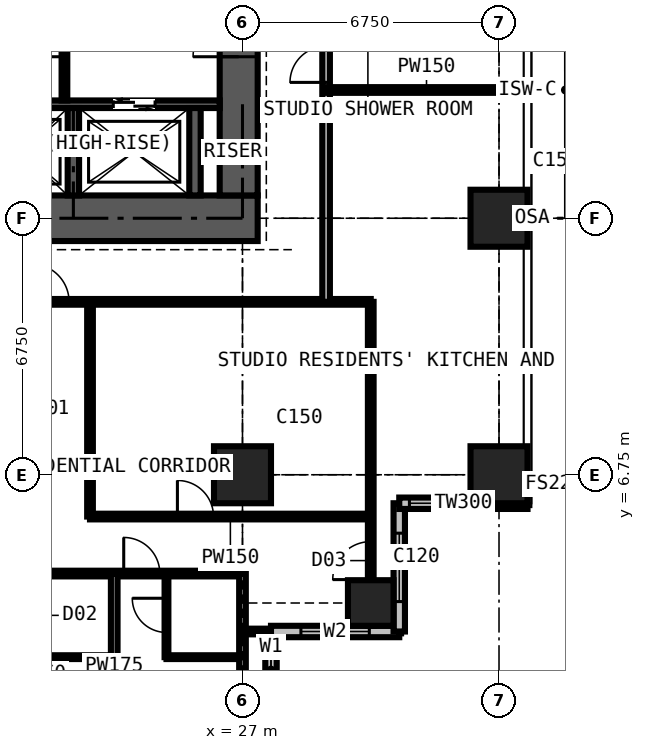
"""IFC4 building model, lengths in metres.
Left out: names, types, materials, properties, quantities, classifications, styles, units other than length and angle.
Written with IfcOpenShell. Run it as: python <this file> out.ifc"""

import sys

from ifc_helpers import new_model, si_unit, direction, frame, frame_2d, origin, origin_2d, place, context, subcontext, project, spatial, rectangle, extrude, element, fill, save


model = new_model("IFC4")
c1 = context("Model", 3, precision=1e-05, world=origin(), true_north=direction((0.0, 1.0)))
c2 = subcontext(c1, "Body", "Model", "MODEL_VIEW")
j1 = project(units=[si_unit("LENGTHUNIT", "METRE"), si_unit("PLANEANGLEUNIT", "RADIAN")], contexts=[c1])
p1 = place(None, origin())
s1 = spatial("IfcSite", under=j1, at=p1, CompositionType="ELEMENT")
p2 = place(p1, origin())
s2 = spatial("IfcBuilding", under=s1, at=p2, CompositionType="ELEMENT")
p3 = place(p2, frame((0.0, 0.0, 160.2)))
s3 = spatial("IfcBuildingStorey", under=s2, at=p3, CompositionType="ELEMENT", Elevation=160.2)
p4 = place(p3, frame((27.0, 6.75, 0.0), z_axis=(0.0, 0.0, 1.0), x_axis=(1.0, 0.0, 0.0)))
e1 = element("IfcColumn", 1, at=p4, inside=s3, PredefinedType="COLUMN", context=c2, shape_type="SweptSolid", body=[
    extrude(rectangle(XDim=1.5, YDim=1.5, at=origin_2d()), origin(), (0.0, 0.0, 1.0), 3.6),
])
p5 = place(p3, frame((30.375, 3.375, 0.0), z_axis=(0.0, 0.0, 1.0), x_axis=(1.0, 0.0, 0.0)))
e2 = element("IfcColumn", 2, at=p5, inside=s3, PredefinedType="COLUMN", context=c2, shape_type="SweptSolid", body=[
    extrude(rectangle(XDim=1.2, YDim=1.2, at=origin_2d()), origin(), (0.0, 0.0, 1.0), 3.6),
])
for number, where, z_axis, x_axis in (
    (3, (33.75, 6.75, 0.0), (0.0, 0.0, 1.0), (1.0, 0.0, 0.0)),
    (4, (33.75, 13.5, 0.0), (0.0, 0.0, 1.0), (1.0, 0.0, 0.0)),
):
    element("IfcColumn", number, at=place(p3, frame(where, z_axis=z_axis, x_axis=x_axis)), inside=s3, PredefinedType="COLUMN", context=c2, shape_type="SweptSolid", body=[
        extrude(rectangle(XDim=1.5, YDim=1.5, at=origin_2d()), origin(), (0.0, 0.0, 1.0), 3.6),
    ])
p6 = place(p3, frame((13.1, 13.5, 0.0), z_axis=(0.0, 0.0, 1.0), x_axis=(1.0, 0.0, 0.0)))
e5 = element("IfcWall", 5, at=p6, inside=s3, PredefinedType="SHEAR", context=c2, shape_type="SweptSolid", body=[
    extrude(rectangle(XDim=14.3, YDim=1.2, at=frame_2d((7.15, 0.0))), origin(), (0.0, 0.0, 1.0), 3.6),
])
p7 = place(p3, frame((26.9, 14.1, 0.0), z_axis=(0.0, 0.0, 1.0), x_axis=(0.0, 1.0, 0.0)))
e6 = element("IfcWall", 6, at=p7, inside=s3, PredefinedType="SHEAR", context=c2, shape_type="SweptSolid", body=[
    extrude(rectangle(XDim=12.3, YDim=1.0, at=frame_2d((6.15, 0.0))), origin(), (0.0, 0.0, 1.0), 3.6),
])
p8 = place(p7, frame((3.65, 0.0, 0.0)))
e7 = element("IfcOpeningElement", 7, at=p8, cuts=e6, PredefinedType="OPENING", context=c2, shape_type="SweptSolid", body=[
    extrude(rectangle(XDim=1.2, YDim=2.2, at=frame_2d((0.6, 1.1))), frame((0.0, 0.51, 0.0), z_axis=(0.0, -1.0, 0.0), x_axis=(1.0, 0.0, 0.0)), (0.0, 0.0, 1.0), 1.02),
])
p9 = place(p3, frame((27.75, -0.75, 0.0), z_axis=(0.0, 0.0, 1.0), x_axis=(0.0, 1.0, 0.0)))
e8 = element("IfcWall", 8, at=p9, inside=s3, PredefinedType="SOLIDWALL", context=c2, shape_type="SweptSolid", body=[
    extrude(rectangle(XDim=3.375, YDim=0.3, at=frame_2d((1.688, 0.0))), origin(), (0.0, 0.0, 1.0), 3.375),
])
p10 = place(p9, frame((1.607, 0.0, 0.9)))
e9 = element("IfcOpeningElement", 9, at=p10, cuts=e8, PredefinedType="OPENING", context=c2, shape_type="SweptSolid", body=[
    extrude(rectangle(XDim=1.5, YDim=1.8, at=frame_2d((0.75, 0.9))), frame((0.0, 0.16, 0.0), z_axis=(0.0, -1.0, 0.0), x_axis=(1.0, 0.0, 0.0)), (0.0, 0.0, 1.0), 0.32),
])
p11 = place(p3, frame((27.75, 2.625, 0.0), z_axis=(0.0, 0.0, 1.0), x_axis=(1.0, 0.0, 0.0)))
e10 = element("IfcWall", 10, at=p11, inside=s3, PredefinedType="SOLIDWALL", context=c2, shape_type="SweptSolid", body=[
    extrude(rectangle(XDim=3.375, YDim=0.3, at=frame_2d((1.688, 0.0))), origin(), (0.0, 0.0, 1.0), 3.375),
])
p12 = place(p11, frame((0.788, 0.0, 0.6)))
e11 = element("IfcOpeningElement", 11, at=p12, cuts=e10, PredefinedType="OPENING", context=c2, shape_type="SweptSolid", body=[
    extrude(rectangle(XDim=1.8, YDim=2.1, at=frame_2d((0.9, 1.05))), frame((0.0, 0.16, 0.0), z_axis=(0.0, -1.0, 0.0), x_axis=(1.0, 0.0, 0.0)), (0.0, 0.0, 1.0), 0.32),
])
p13 = place(p3, frame((31.125, 2.625, 0.0), z_axis=(0.0, 0.0, 1.0), x_axis=(0.0, 1.0, 0.0)))
e12 = element("IfcWall", 12, at=p13, inside=s3, PredefinedType="SOLIDWALL", context=c2, shape_type="SweptSolid", body=[
    extrude(rectangle(XDim=3.375, YDim=0.3, at=frame_2d((1.688, 0.0))), origin(), (0.0, 0.0, 1.0), 3.375),
])
p14 = place(p13, frame((0.788, 0.0, 0.6)))
e13 = element("IfcOpeningElement", 13, at=p14, cuts=e12, PredefinedType="OPENING", context=c2, shape_type="SweptSolid", body=[
    extrude(rectangle(XDim=1.8, YDim=2.1, at=frame_2d((0.9, 1.05))), frame((0.0, 0.16, 0.0), z_axis=(0.0, -1.0, 0.0), x_axis=(1.0, 0.0, 0.0)), (0.0, 0.0, 1.0), 0.32),
])
p15 = place(p3, frame((31.125, 6.0, 0.0), z_axis=(0.0, 0.0, 1.0), x_axis=(1.0, 0.0, 0.0)))
e14 = element("IfcWall", 14, at=p15, inside=s3, PredefinedType="SOLIDWALL", context=c2, shape_type="SweptSolid", body=[
    extrude(rectangle(XDim=3.375, YDim=0.3, at=frame_2d((1.688, 0.0))), origin(), (0.0, 0.0, 1.0), 3.375),
])
p16 = place(p15, frame((0.268, 0.0, 0.9)))
e15 = element("IfcOpeningElement", 15, at=p16, cuts=e14, PredefinedType="OPENING", context=c2, shape_type="SweptSolid", body=[
    extrude(rectangle(XDim=1.5, YDim=1.8, at=frame_2d((0.75, 0.9))), frame((0.0, 0.16, 0.0), z_axis=(0.0, -1.0, 0.0), x_axis=(1.0, 0.0, 0.0)), (0.0, 0.0, 1.0), 0.32),
])
p17 = place(p3, frame((14.1, 16.5, 0.0), z_axis=(0.0, 0.0, 1.0), x_axis=(1.0, 0.0, 0.0)))
e16 = element("IfcWall", 16, at=p17, inside=s3, PredefinedType="SHEAR", context=c2, shape_type="SweptSolid", body=[
    extrude(rectangle(XDim=12.3, YDim=0.2, at=frame_2d((6.15, 0.0))), origin(), (0.0, 0.0, 1.0), 3.6),
])
p18 = place(p17, frame((0.9, 0.0, 0.0)))
e17 = element("IfcOpeningElement", 17, at=p18, cuts=e16, PredefinedType="OPENING", context=c2, shape_type="SweptSolid", body=[
    extrude(rectangle(XDim=1.1, YDim=2.2, at=frame_2d((0.55, 1.1))), frame((0.0, 0.11, 0.0), z_axis=(0.0, -1.0, 0.0), x_axis=(1.0, 0.0, 0.0)), (0.0, 0.0, 1.0), 0.22),
])
p19 = place(p17, frame((4.31, 0.0, 0.0)))
e18 = element("IfcOpeningElement", 18, at=p19, cuts=e16, PredefinedType="OPENING", context=c2, shape_type="SweptSolid", body=[
    extrude(rectangle(XDim=1.1, YDim=2.2, at=frame_2d((0.55, 1.1))), frame((0.0, 0.11, 0.0), z_axis=(0.0, -1.0, 0.0), x_axis=(1.0, 0.0, 0.0)), (0.0, 0.0, 1.0), 0.22),
])
p20 = place(p17, frame((6.45, 0.0, 0.0)))
e19 = element("IfcOpeningElement", 19, at=p20, cuts=e16, PredefinedType="OPENING", context=c2, shape_type="SweptSolid", body=[
    extrude(rectangle(XDim=1.1, YDim=2.2, at=frame_2d((0.55, 1.1))), frame((0.0, 0.11, 0.0), z_axis=(0.0, -1.0, 0.0), x_axis=(1.0, 0.0, 0.0)), (0.0, 0.0, 1.0), 0.22),
])
p21 = place(p17, frame((9.5, 0.0, 0.0)))
e20 = element("IfcOpeningElement", 20, at=p21, cuts=e16, PredefinedType="OPENING", context=c2, shape_type="SweptSolid", body=[
    extrude(rectangle(XDim=1.1, YDim=2.2, at=frame_2d((0.55, 1.1))), frame((0.0, 0.11, 0.0), z_axis=(0.0, -1.0, 0.0), x_axis=(1.0, 0.0, 0.0)), (0.0, 0.0, 1.0), 0.22),
])
for number, where, z_axis, x_axis in (
    (21, (22.55, 14.1, 0.0), (0.0, 0.0, 1.0), (0.0, 1.0, 0.0)),
    (22, (25.75, 14.1, 0.0), (0.0, 0.0, 1.0), (0.0, 1.0, 0.0)),
):
    element("IfcWall", number, at=place(p3, frame(where, z_axis=z_axis, x_axis=x_axis)), inside=s3, PredefinedType="SHEAR", context=c2, shape_type="SweptSolid", body=[
        extrude(rectangle(XDim=2.3, YDim=0.3, at=frame_2d((1.15, 0.0))), origin(), (0.0, 0.0, 1.0), 3.6),
    ])
p22 = place(p3, frame((22.315, 16.6, 0.0), z_axis=(0.0, 0.0, 1.0), x_axis=(0.0, 1.0, 0.0)))
e23 = element("IfcWall", 23, at=p22, inside=s3, PredefinedType="PARTITIONING", context=c2, shape_type="SweptSolid", body=[
    extrude(rectangle(XDim=3.5, YDim=0.15, at=frame_2d((1.75, 0.0))), origin(), (0.0, 0.0, 1.0), 3.375),
])
p23 = place(p22, frame((1.15, 0.0, 0.0)))
e24 = element("IfcOpeningElement", 24, at=p23, cuts=e23, PredefinedType="OPENING", context=c2, shape_type="SweptSolid", body=[
    extrude(rectangle(XDim=1.2, YDim=2.2, at=frame_2d((0.6, 1.1))), frame((0.0, 0.085, 0.0), z_axis=(0.0, -1.0, 0.0), x_axis=(1.0, 0.0, 0.0)), (0.0, 0.0, 1.0), 0.17),
])
p24 = place(p3, frame((6.75, 4.15, 0.0), z_axis=(0.0, 0.0, 1.0), x_axis=(1.0, 0.0, 0.0)))
e25 = element("IfcWall", 25, at=p24, inside=s3, PredefinedType="PARTITIONING", context=c2, shape_type="SweptSolid", body=[
    extrude(rectangle(XDim=20.25, YDim=0.15, at=frame_2d((10.125, 0.0))), origin(), (0.0, 0.0, 1.0), 3.375),
])
p25 = place(p24, frame((1.2, 0.0, 0.0)))
e26 = element("IfcOpeningElement", 26, at=p25, cuts=e25, PredefinedType="OPENING", context=c2, shape_type="SweptSolid", body=[
    extrude(rectangle(XDim=1.0, YDim=2.2, at=frame_2d((0.5, 1.1))), frame((0.0, 0.085, 0.0), z_axis=(0.0, -1.0, 0.0), x_axis=(1.0, 0.0, 0.0)), (0.0, 0.0, 1.0), 0.17),
])
p26 = place(p24, frame((3.575, 0.0, 0.0)))
e27 = element("IfcOpeningElement", 27, at=p26, cuts=e25, PredefinedType="OPENING", context=c2, shape_type="SweptSolid", body=[
    extrude(rectangle(XDim=0.95, YDim=2.2, at=frame_2d((0.475, 1.1))), frame((0.0, 0.085, 0.0), z_axis=(0.0, -1.0, 0.0), x_axis=(1.0, 0.0, 0.0)), (0.0, 0.0, 1.0), 0.17),
])
p27 = place(p24, frame((7.0, 0.0, 0.0)))
e28 = element("IfcOpeningElement", 28, at=p27, cuts=e25, PredefinedType="OPENING", context=c2, shape_type="SweptSolid", body=[
    extrude(rectangle(XDim=0.95, YDim=2.2, at=frame_2d((0.475, 1.1))), frame((0.0, 0.085, 0.0), z_axis=(0.0, -1.0, 0.0), x_axis=(1.0, 0.0, 0.0)), (0.0, 0.0, 1.0), 0.17),
])
p28 = place(p24, frame((10.325, 0.0, 0.0)))
e29 = element("IfcOpeningElement", 29, at=p28, cuts=e25, PredefinedType="OPENING", context=c2, shape_type="SweptSolid", body=[
    extrude(rectangle(XDim=0.95, YDim=2.2, at=frame_2d((0.475, 1.1))), frame((0.0, 0.085, 0.0), z_axis=(0.0, -1.0, 0.0), x_axis=(1.0, 0.0, 0.0)), (0.0, 0.0, 1.0), 0.17),
])
p29 = place(p24, frame((13.75, 0.0, 0.0)))
e30 = element("IfcOpeningElement", 30, at=p29, cuts=e25, PredefinedType="OPENING", context=c2, shape_type="SweptSolid", body=[
    extrude(rectangle(XDim=0.95, YDim=2.2, at=frame_2d((0.475, 1.1))), frame((0.0, 0.085, 0.0), z_axis=(0.0, -1.0, 0.0), x_axis=(1.0, 0.0, 0.0)), (0.0, 0.0, 1.0), 0.17),
])
p30 = place(p24, frame((17.125, 0.0, 0.0)))
e31 = element("IfcOpeningElement", 31, at=p30, cuts=e25, PredefinedType="OPENING", context=c2, shape_type="SweptSolid", body=[
    extrude(rectangle(XDim=0.95, YDim=2.2, at=frame_2d((0.475, 1.1))), frame((0.0, 0.085, 0.0), z_axis=(0.0, -1.0, 0.0), x_axis=(1.0, 0.0, 0.0)), (0.0, 0.0, 1.0), 0.17),
])
p31 = place(p3, frame((10.125, 11.3, 0.0), z_axis=(0.0, 0.0, 1.0), x_axis=(1.0, 0.0, 0.0)))
e32 = element("IfcWall", 32, at=p31, inside=s3, PredefinedType="PARTITIONING", context=c2, shape_type="SweptSolid", body=[
    extrude(rectangle(XDim=20.25, YDim=0.15, at=frame_2d((10.125, 0.0))), origin(), (0.0, 0.0, 1.0), 3.375),
])
p32 = place(p31, frame((5.2, 0.0, 0.0)))
e33 = element("IfcOpeningElement", 33, at=p32, cuts=e32, PredefinedType="OPENING", context=c2, shape_type="SweptSolid", body=[
    extrude(rectangle(XDim=1.0, YDim=2.2, at=frame_2d((0.5, 1.1))), frame((0.0, 0.085, 0.0), z_axis=(0.0, -1.0, 0.0), x_axis=(1.0, 0.0, 0.0)), (0.0, 0.0, 1.0), 0.17),
])
p33 = place(p31, frame((11.312, 0.0, 0.0)))
e34 = element("IfcOpeningElement", 34, at=p33, cuts=e32, PredefinedType="OPENING", context=c2, shape_type="SweptSolid", body=[
    extrude(rectangle(XDim=1.0, YDim=2.2, at=frame_2d((0.5, 1.1))), frame((0.0, 0.085, 0.0), z_axis=(0.0, -1.0, 0.0), x_axis=(1.0, 0.0, 0.0)), (0.0, 0.0, 1.0), 0.17),
])
p34 = place(p31, frame((3.325, 0.0, 0.0)))
e35 = element("IfcOpeningElement", 35, at=p34, cuts=e32, PredefinedType="OPENING", context=c2, shape_type="SweptSolid", body=[
    extrude(rectangle(XDim=0.95, YDim=2.2, at=frame_2d((0.475, 1.1))), frame((0.0, 0.085, 0.0), z_axis=(0.0, -1.0, 0.0), x_axis=(1.0, 0.0, 0.0)), (0.0, 0.0, 1.0), 0.17),
])
p35 = place(p3, frame((21.625, 1.95, 0.0), z_axis=(0.0, 0.0, 1.0), x_axis=(1.0, 0.0, 0.0)))
e36 = element("IfcWall", 36, at=p35, inside=s3, PredefinedType="PARTITIONING", context=c2, shape_type="SweptSolid", body=[
    extrude(rectangle(XDim=2.0, YDim=0.1, at=frame_2d((1.0, 0.0))), origin(), (0.0, 0.0, 1.0), 3.375),
])
p36 = place(p3, frame((22.988, 5.65, 0.0), z_axis=(0.0, 0.0, 1.0), x_axis=(1.0, 0.0, 0.0)))
e37 = element("IfcWall", 37, at=p36, inside=s3, PredefinedType="PARTITIONING", context=c2, shape_type="SweptSolid", body=[
    extrude(rectangle(XDim=7.387, YDim=0.15, at=frame_2d((3.694, 0.0))), origin(), (0.0, 0.0, 1.0), 3.375),
])
p37 = place(p36, frame((2.3, 0.0, 0.0)))
e38 = element("IfcOpeningElement", 38, at=p37, cuts=e37, PredefinedType="OPENING", context=c2, shape_type="SweptSolid", body=[
    extrude(rectangle(XDim=0.95, YDim=2.2, at=frame_2d((0.475, 1.1))), frame((0.0, 0.085, 0.0), z_axis=(0.0, -1.0, 0.0), x_axis=(1.0, 0.0, 0.0)), (0.0, 0.0, 1.0), 0.17),
])
p38 = place(p3, frame((22.988, 5.65, 0.0), z_axis=(0.0, 0.0, 1.0), x_axis=(0.0, 1.0, 0.0)))
e39 = element("IfcWall", 39, at=p38, inside=s3, PredefinedType="PARTITIONING", context=c2, shape_type="SweptSolid", body=[
    extrude(rectangle(XDim=5.65, YDim=0.15, at=frame_2d((2.825, 0.0))), origin(), (0.0, 0.0, 1.0), 3.375),
])
p39 = place(p3, frame((23.625, -0.734, 0.0), z_axis=(0.0, 0.0, 1.0), x_axis=(0.0, 1.0, 0.0)))
e40 = element("IfcWall", 40, at=p39, inside=s3, PredefinedType="PARTITIONING", context=c2, shape_type="SweptSolid", body=[
    extrude(rectangle(XDim=4.884, YDim=0.175, at=frame_2d((2.442, 0.0))), origin(), (0.0, 0.0, 1.0), 3.375),
])
p40 = place(p3, frame((25.0, 1.95, 0.0), z_axis=(0.0, 0.0, 1.0), x_axis=(0.0, 1.0, 0.0)))
e41 = element("IfcWall", 41, at=p40, inside=s3, PredefinedType="PARTITIONING", context=c2, shape_type="SweptSolid", body=[
    extrude(rectangle(XDim=2.2, YDim=0.1, at=frame_2d((1.1, 0.0))), origin(), (0.0, 0.0, 1.0), 3.375),
])
p41 = place(p40, frame((0.65, 0.0, 0.0)))
e42 = element("IfcOpeningElement", 42, at=p41, cuts=e41, PredefinedType="OPENING", context=c2, shape_type="SweptSolid", body=[
    extrude(rectangle(XDim=0.9, YDim=2.2, at=frame_2d((0.45, 1.1))), frame((0.0, 0.06, 0.0), z_axis=(0.0, -1.0, 0.0), x_axis=(1.0, 0.0, 0.0)), (0.0, 0.0, 1.0), 0.12),
])
p42 = place(p3, frame((25.0, 1.95, 0.0), z_axis=(0.0, 0.0, 1.0), x_axis=(1.0, 0.0, 0.0)))
e43 = element("IfcWall", 43, at=p42, inside=s3, PredefinedType="PARTITIONING", context=c2, shape_type="SweptSolid", body=[
    extrude(rectangle(XDim=2.0, YDim=0.1, at=frame_2d((1.0, 0.0))), origin(), (0.0, 0.0, 1.0), 3.375),
])
p43 = place(p3, frame((27.0, -0.734, 0.0), z_axis=(0.0, 0.0, 1.0), x_axis=(0.0, 1.0, 0.0)))
e44 = element("IfcWall", 44, at=p43, inside=s3, PredefinedType="PARTITIONING", context=c2, shape_type="SweptSolid", body=[
    extrude(rectangle(XDim=4.884, YDim=0.175, at=frame_2d((2.442, 0.0))), origin(), (0.0, 0.0, 1.0), 2.877),
])
p44 = place(p3, frame((27.0, 2.625, 0.0), z_axis=(0.0, 0.0, 1.0), x_axis=(1.0, 0.0, 0.0)))
e45 = element("IfcWall", 45, at=p44, inside=s3, PredefinedType="PARTITIONING", context=c2, shape_type="SweptSolid", body=[
    extrude(rectangle(XDim=0.734, YDim=0.15, at=frame_2d((0.367, 0.0))), origin(), (0.0, 0.0, 1.0), 3.375),
])
p45 = place(p3, frame((29.2, 11.3, 0.0), z_axis=(0.0, 0.0, 1.0), x_axis=(0.0, 1.0, 0.0)))
e46 = element("IfcWall", 46, at=p45, inside=s3, PredefinedType="PARTITIONING", context=c2, shape_type="SweptSolid", body=[
    extrude(rectangle(XDim=17.9, YDim=0.2, at=frame_2d((8.95, 0.0))), origin(), (0.0, 0.0, 1.0), 3.375),
])
p46 = place(p45, frame((10.55, 0.0, 0.0)))
e47 = element("IfcOpeningElement", 47, at=p46, cuts=e46, PredefinedType="OPENING", context=c2, shape_type="SweptSolid", body=[
    extrude(rectangle(XDim=0.95, YDim=2.2, at=frame_2d((0.475, 1.1))), frame((0.0, 0.11, 0.0), z_axis=(0.0, -1.0, 0.0), x_axis=(1.0, 0.0, 0.0)), (0.0, 0.0, 1.0), 0.22),
])
p47 = place(p45, frame((5.775, 0.0, 0.0)))
e48 = element("IfcOpeningElement", 48, at=p47, cuts=e46, PredefinedType="OPENING", context=c2, shape_type="SweptSolid", body=[
    extrude(rectangle(XDim=0.95, YDim=2.2, at=frame_2d((0.475, 1.1))), frame((0.0, 0.11, 0.0), z_axis=(0.0, -1.0, 0.0), x_axis=(1.0, 0.0, 0.0)), (0.0, 0.0, 1.0), 0.22),
])
p48 = place(p45, frame((16.3, 0.0, 0.0)))
e49 = element("IfcOpeningElement", 49, at=p48, cuts=e46, PredefinedType="OPENING", context=c2, shape_type="SweptSolid", body=[
    extrude(rectangle(XDim=1.0, YDim=2.2, at=frame_2d((0.5, 1.1))), frame((0.0, 0.11, 0.0), z_axis=(0.0, -1.0, 0.0), x_axis=(1.0, 0.0, 0.0)), (0.0, 0.0, 1.0), 0.22),
])
p49 = place(p3, frame((29.2, 16.875, 0.0), z_axis=(0.0, 0.0, 1.0), x_axis=(1.0, 0.0, 0.0)))
e50 = element("IfcWall", 50, at=p49, inside=s3, PredefinedType="PARTITIONING", context=c2, shape_type="SweptSolid", body=[
    extrude(rectangle(XDim=5.284, YDim=0.15, at=frame_2d((2.642, 0.0))), origin(), (0.0, 0.0, 1.0), 3.375),
])
p50 = place(p3, frame((30.375, 2.775, 0.0), z_axis=(0.0, 0.0, 1.0), x_axis=(0.0, 1.0, 0.0)))
e51 = element("IfcWall", 51, at=p50, inside=s3, PredefinedType="PARTITIONING", context=c2, shape_type="SweptSolid", body=[
    extrude(rectangle(XDim=8.525, YDim=0.15, at=frame_2d((4.263, 0.0))), origin(), (0.0, 0.0, 1.0), 2.877),
])
p51 = place(p50, frame((1.216, 0.0, 0.0)))
e52 = element("IfcOpeningElement", 52, at=p51, cuts=e51, PredefinedType="OPENING", context=c2, shape_type="SweptSolid", body=[
    extrude(rectangle(XDim=1.0, YDim=2.2, at=frame_2d((0.5, 1.1))), frame((0.0, 0.085, 0.0), z_axis=(0.0, -1.0, 0.0), x_axis=(1.0, 0.0, 0.0)), (0.0, 0.0, 1.0), 0.17),
])
p52 = place(p10, origin())
e53 = element("IfcWindow", 53, at=p52, inside=s3, PartitioningType="SINGLE_PANEL", PredefinedType="WINDOW", context=c2, shape_type="SweptSolid", body=[
    extrude(rectangle(XDim=1.5, YDim=1.8, at=frame_2d((0.75, 0.9))), frame((0.0, 0.03, 0.0), z_axis=(0.0, -1.0, 0.0), x_axis=(1.0, 0.0, 0.0)), (0.0, 0.0, 1.0), 0.06),
])
fill(e9, e53)
p53 = place(p12, origin())
e54 = element("IfcWindow", 54, at=p53, inside=s3, PartitioningType="SINGLE_PANEL", PredefinedType="WINDOW", context=c2, shape_type="SweptSolid", body=[
    extrude(rectangle(XDim=1.8, YDim=2.1, at=frame_2d((0.9, 1.05))), frame((0.0, 0.03, 0.0), z_axis=(0.0, -1.0, 0.0), x_axis=(1.0, 0.0, 0.0)), (0.0, 0.0, 1.0), 0.06),
])
fill(e11, e54)
p54 = place(p14, origin())
e55 = element("IfcWindow", 55, at=p54, inside=s3, PartitioningType="SINGLE_PANEL", PredefinedType="WINDOW", context=c2, shape_type="SweptSolid", body=[
    extrude(rectangle(XDim=1.8, YDim=2.1, at=frame_2d((0.9, 1.05))), frame((0.0, 0.03, 0.0), z_axis=(0.0, -1.0, 0.0), x_axis=(1.0, 0.0, 0.0)), (0.0, 0.0, 1.0), 0.06),
])
fill(e13, e55)
p55 = place(p16, origin())
e56 = element("IfcWindow", 56, at=p55, inside=s3, PartitioningType="SINGLE_PANEL", PredefinedType="WINDOW", context=c2, shape_type="SweptSolid", body=[
    extrude(rectangle(XDim=1.5, YDim=1.8, at=frame_2d((0.75, 0.9))), frame((0.0, 0.03, 0.0), z_axis=(0.0, -1.0, 0.0), x_axis=(1.0, 0.0, 0.0)), (0.0, 0.0, 1.0), 0.06),
])
fill(e15, e56)
p56 = place(p21, origin())
e57 = element("IfcDoor", 57, at=p56, inside=s3, OperationType="DOUBLE_DOOR_SLIDING", PredefinedType="DOOR", context=c2, shape_type="SweptSolid", body=[
    extrude(rectangle(XDim=1.1, YDim=2.2, at=frame_2d((0.55, 1.1))), frame((0.0, 0.025, 0.0), z_axis=(0.0, -1.0, 0.0), x_axis=(1.0, 0.0, 0.0)), (0.0, 0.0, 1.0), 0.05),
])
fill(e20, e57)
p57 = place(p8, origin())
e58 = element("IfcDoor", 58, at=p57, inside=s3, OperationType="DOUBLE_DOOR_SINGLE_SWING", PredefinedType="DOOR", context=c2, shape_type="SweptSolid", body=[
    extrude(rectangle(XDim=1.2, YDim=2.2, at=frame_2d((0.6, 1.1))), frame((0.0, 0.025, 0.0), z_axis=(0.0, -1.0, 0.0), x_axis=(1.0, 0.0, 0.0)), (0.0, 0.0, 1.0), 0.05),
])
fill(e7, e58)
p58 = place(p23, origin())
e59 = element("IfcDoor", 59, at=p58, inside=s3, OperationType="DOUBLE_DOOR_SINGLE_SWING", PredefinedType="DOOR", context=c2, shape_type="SweptSolid", body=[
    extrude(rectangle(XDim=1.2, YDim=2.2, at=frame_2d((0.6, 1.1))), frame((0.0, 0.025, 0.0), z_axis=(0.0, -1.0, 0.0), x_axis=(1.0, 0.0, 0.0)), (0.0, 0.0, 1.0), 0.05),
])
fill(e24, e59)
p59 = place(p30, origin())
e60 = element("IfcDoor", 60, at=p59, inside=s3, OperationType="SINGLE_SWING_LEFT", PredefinedType="DOOR", context=c2, shape_type="SweptSolid", body=[
    extrude(rectangle(XDim=0.95, YDim=2.2, at=frame_2d((0.475, 1.1))), frame((0.0, 0.025, 0.0), z_axis=(0.0, -1.0, 0.0), x_axis=(1.0, 0.0, 0.0)), (0.0, 0.0, 1.0), 0.05),
])
fill(e31, e60)
p60 = place(p41, origin())
e61 = element("IfcDoor", 61, at=p60, inside=s3, OperationType="SINGLE_SWING_RIGHT", PredefinedType="DOOR", context=c2, shape_type="SweptSolid", body=[
    extrude(rectangle(XDim=0.9, YDim=2.2, at=frame_2d((0.45, 1.1))), frame((0.0, 0.025, 0.0), z_axis=(0.0, -1.0, 0.0), x_axis=(1.0, 0.0, 0.0)), (0.0, 0.0, 1.0), 0.05),
])
fill(e42, e61)
p61 = place(p33, origin())
e62 = element("IfcDoor", 62, at=p61, inside=s3, OperationType="SINGLE_SWING_LEFT", PredefinedType="DOOR", context=c2, shape_type="SweptSolid", body=[
    extrude(rectangle(XDim=1.0, YDim=2.2, at=frame_2d((0.5, 1.1))), frame((0.0, 0.025, 0.0), z_axis=(0.0, -1.0, 0.0), x_axis=(1.0, 0.0, 0.0)), (0.0, 0.0, 1.0), 0.05),
])
fill(e34, e62)
p62 = place(p37, origin())
e63 = element("IfcDoor", 63, at=p62, inside=s3, OperationType="SINGLE_SWING_LEFT", PredefinedType="DOOR", context=c2, shape_type="SweptSolid", body=[
    extrude(rectangle(XDim=0.95, YDim=2.2, at=frame_2d((0.475, 1.1))), frame((0.0, 0.025, 0.0), z_axis=(0.0, -1.0, 0.0), x_axis=(1.0, 0.0, 0.0)), (0.0, 0.0, 1.0), 0.05),
])
fill(e38, e63)
p63 = place(p51, origin())
e64 = element("IfcDoor", 64, at=p63, inside=s3, OperationType="SINGLE_SWING_LEFT", PredefinedType="DOOR", context=c2, shape_type="SweptSolid", body=[
    extrude(rectangle(XDim=1.0, YDim=2.2, at=frame_2d((0.5, 1.1))), frame((0.0, 0.025, 0.0), z_axis=(0.0, -1.0, 0.0), x_axis=(1.0, 0.0, 0.0)), (0.0, 0.0, 1.0), 0.05),
])
fill(e52, e64)
p64 = place(p47, origin())
e65 = element("IfcDoor", 65, at=p64, inside=s3, OperationType="SINGLE_SWING_LEFT", PredefinedType="DOOR", context=c2, shape_type="SweptSolid", body=[
    extrude(rectangle(XDim=0.95, YDim=2.2, at=frame_2d((0.475, 1.1))), frame((0.0, 0.025, 0.0), z_axis=(0.0, -1.0, 0.0), x_axis=(1.0, 0.0, 0.0)), (0.0, 0.0, 1.0), 0.05),
])
fill(e48, e65)
save(model, sys.argv[1])
